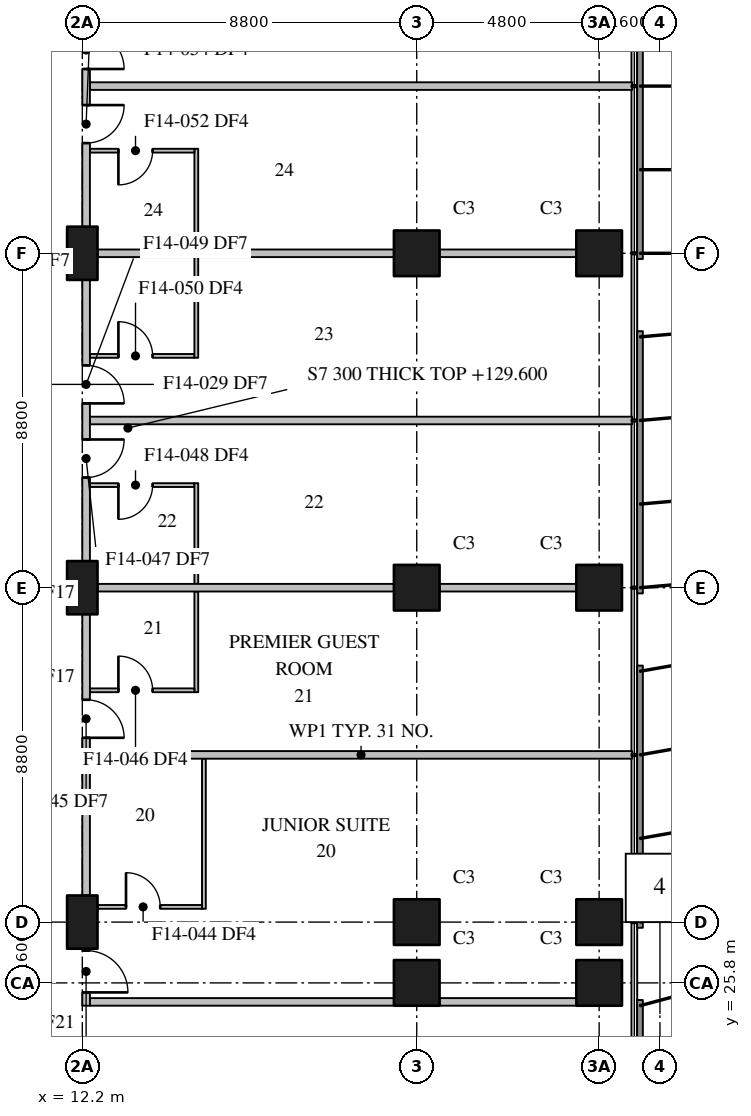
"""IFC4 building model, lengths in metres.
Left out: names, types, materials, properties, quantities, classifications, styles, units other than length and angle.
Written with IfcOpenShell. Run it as: python <this file> out.ifc"""

import sys

from ifc_helpers import new_model, si_unit, direction, frame, frame_2d, origin, origin_2d, place, context, subcontext, project, spatial, rectangle, extrude, element, fill, save


model = new_model("IFC4")
c1 = context("Model", 3, precision=1e-05, world=origin(), true_north=direction((0.0, 1.0)))
c2 = subcontext(c1, "Body", "Model", "MODEL_VIEW")
j1 = project(units=[si_unit("LENGTHUNIT", "METRE"), si_unit("PLANEANGLEUNIT", "RADIAN")], contexts=[c1])
p1 = place(None, origin())
s1 = spatial("IfcSite", under=j1, at=p1, CompositionType="ELEMENT")
p2 = place(p1, origin())
s2 = spatial("IfcBuilding", under=s1, at=p2, CompositionType="ELEMENT")
p3 = place(p2, frame((0.0, 0.0, 129.6)))
s3 = spatial("IfcBuildingStorey", under=s2, at=p3, CompositionType="ELEMENT", Elevation=129.6)
for number, where, z_axis, x_axis in (
    (1, (12.2, 27.4, 0.0), (0.0, 0.0, 1.0), (0.0, 1.0, 0.0)),
    (2, (12.2, 36.2, 0.0), (0.0, 0.0, 1.0), (0.0, 1.0, 0.0)),
    (3, (12.2, 45.0, 0.0), (0.0, 0.0, 1.0), (0.0, 1.0, 0.0)),
):
    element("IfcColumn", number, at=place(p3, frame(where, z_axis=z_axis, x_axis=x_axis)), inside=s3, PredefinedType="COLUMN", context=c2, shape_type="SweptSolid", body=[
        extrude(rectangle(XDim=1.4, YDim=0.8, at=origin_2d()), origin(), (0.0, 0.0, 1.0), 3.7),
    ])
for number, where, z_axis, x_axis in (
    (4, (21.0, 25.8, 0.0), (0.0, 0.0, 1.0), (1.0, 0.0, 0.0)),
    (5, (21.0, 27.4, 0.0), (0.0, 0.0, 1.0), (1.0, 0.0, 0.0)),
    (6, (21.0, 36.2, 0.0), (0.0, 0.0, 1.0), (1.0, 0.0, 0.0)),
    (7, (21.0, 45.0, 0.0), (0.0, 0.0, 1.0), (1.0, 0.0, 0.0)),
    (8, (25.8, 25.8, 0.0), (0.0, 0.0, 1.0), (1.0, 0.0, 0.0)),
    (9, (25.8, 27.4, 0.0), (0.0, 0.0, 1.0), (1.0, 0.0, 0.0)),
    (10, (25.8, 36.2, 0.0), (0.0, 0.0, 1.0), (1.0, 0.0, 0.0)),
    (11, (25.8, 45.0, 0.0), (0.0, 0.0, 1.0), (1.0, 0.0, 0.0)),
):
    element("IfcColumn", number, at=place(p3, frame(where, z_axis=z_axis, x_axis=x_axis)), inside=s3, PredefinedType="COLUMN", context=c2, shape_type="SweptSolid", body=[
        extrude(rectangle(XDim=1.2, YDim=1.2, at=origin_2d()), origin(), (0.0, 0.0, 1.0), 3.7),
    ])
p4 = place(p3, frame((12.4, 31.8, 0.0), z_axis=(0.0, 0.0, 1.0), x_axis=(1.0, 0.0, 0.0)))
e12 = element("IfcWall", 12, at=p4, inside=s3, PredefinedType="PARTITIONING", context=c2, shape_type="SweptSolid", body=[
    extrude(rectangle(XDim=14.27, YDim=0.2, at=frame_2d((7.135, 0.0))), origin(), (0.0, 0.0, 1.0), 3.25),
])
p5 = place(p3, frame((12.6, 36.2, 0.0), z_axis=(0.0, 0.0, 1.0), x_axis=(1.0, 0.0, 0.0)))
e13 = element("IfcWall", 13, at=p5, inside=s3, PredefinedType="PARTITIONING", context=c2, shape_type="SweptSolid", body=[
    extrude(rectangle(XDim=7.8, YDim=0.2, at=frame_2d((3.9, 0.0))), origin(), (0.0, 0.0, 1.0), 3.25),
])
p6 = place(p3, frame((21.6, 36.2, 0.0), z_axis=(0.0, 0.0, 1.0), x_axis=(1.0, 0.0, 0.0)))
e14 = element("IfcWall", 14, at=p6, inside=s3, PredefinedType="PARTITIONING", context=c2, shape_type="SweptSolid", body=[
    extrude(rectangle(XDim=3.6, YDim=0.2, at=frame_2d((1.8, 0.0))), origin(), (0.0, 0.0, 1.0), 3.25),
])
p7 = place(p3, frame((12.4, 40.6, 0.0), z_axis=(0.0, 0.0, 1.0), x_axis=(1.0, 0.0, 0.0)))
e15 = element("IfcWall", 15, at=p7, inside=s3, PredefinedType="PARTITIONING", context=c2, shape_type="SweptSolid", body=[
    extrude(rectangle(XDim=14.27, YDim=0.2, at=frame_2d((7.135, 0.0))), origin(), (0.0, 0.0, 1.0), 3.25),
])
p8 = place(p3, frame((12.6, 45.0, 0.0), z_axis=(0.0, 0.0, 1.0), x_axis=(1.0, 0.0, 0.0)))
e16 = element("IfcWall", 16, at=p8, inside=s3, PredefinedType="PARTITIONING", context=c2, shape_type="SweptSolid", body=[
    extrude(rectangle(XDim=7.8, YDim=0.2, at=frame_2d((3.9, 0.0))), origin(), (0.0, 0.0, 1.0), 3.25),
])
p9 = place(p3, frame((21.6, 45.0, 0.0), z_axis=(0.0, 0.0, 1.0), x_axis=(1.0, 0.0, 0.0)))
e17 = element("IfcWall", 17, at=p9, inside=s3, PredefinedType="PARTITIONING", context=c2, shape_type="SweptSolid", body=[
    extrude(rectangle(XDim=3.6, YDim=0.2, at=frame_2d((1.8, 0.0))), origin(), (0.0, 0.0, 1.0), 3.25),
])
p10 = place(p3, frame((12.4, 49.4, 0.0), z_axis=(0.0, 0.0, 1.0), x_axis=(1.0, 0.0, 0.0)))
e18 = element("IfcWall", 18, at=p10, inside=s3, PredefinedType="PARTITIONING", context=c2, shape_type="SweptSolid", body=[
    extrude(rectangle(XDim=14.27, YDim=0.2, at=frame_2d((7.135, 0.0))), origin(), (0.0, 0.0, 1.0), 3.25),
])
p11 = place(p3, frame((12.3, 26.7, 0.0), z_axis=(0.0, 0.0, 1.0), x_axis=(0.0, -1.0, 0.0)))
e19 = element("IfcWall", 19, at=p11, inside=s3, PredefinedType="PARTITIONING", context=c2, shape_type="SweptSolid", body=[
    extrude(rectangle(XDim=1.5, YDim=0.2, at=frame_2d((0.75, 0.0))), origin(), (0.0, 0.0, 1.0), 3.25),
])
p12 = place(p11, frame((0.05, 0.0, 0.0)))
e20 = element("IfcOpeningElement", 20, at=p12, cuts=e19, PredefinedType="OPENING", context=c2, shape_type="SweptSolid", body=[
    extrude(rectangle(XDim=1.1, YDim=2.1, at=frame_2d((0.55, 1.05))), frame((0.0, 0.11, 0.0), z_axis=(0.0, -1.0, 0.0), x_axis=(1.0, 0.0, 0.0)), (0.0, 0.0, 1.0), 0.22),
])
p13 = place(p3, frame((12.3, 35.5, 0.0), z_axis=(0.0, 0.0, 1.0), x_axis=(0.0, -1.0, 0.0)))
e21 = element("IfcWall", 21, at=p13, inside=s3, PredefinedType="PARTITIONING", context=c2, shape_type="SweptSolid", body=[
    extrude(rectangle(XDim=7.4, YDim=0.2, at=frame_2d((3.7, 0.0))), origin(), (0.0, 0.0, 1.0), 3.25),
])
p14 = place(p13, frame((2.25, 0.0, 0.0)))
e22 = element("IfcOpeningElement", 22, at=p14, cuts=e21, PredefinedType="OPENING", context=c2, shape_type="SweptSolid", body=[
    extrude(rectangle(XDim=1.0, YDim=2.1, at=frame_2d((0.5, 1.05))), frame((0.0, 0.11, 0.0), z_axis=(0.0, -1.0, 0.0), x_axis=(1.0, 0.0, 0.0)), (0.0, 0.0, 1.0), 0.22),
])
p15 = place(p3, frame((12.3, 44.3, 0.0), z_axis=(0.0, 0.0, 1.0), x_axis=(0.0, -1.0, 0.0)))
e23 = element("IfcWall", 23, at=p15, inside=s3, PredefinedType="PARTITIONING", context=c2, shape_type="SweptSolid", body=[
    extrude(rectangle(XDim=7.4, YDim=0.2, at=frame_2d((3.7, 0.0))), origin(), (0.0, 0.0, 1.0), 3.25),
])
p16 = place(p15, frame((4.2, 0.0, 0.0)))
e24 = element("IfcOpeningElement", 24, at=p16, cuts=e23, PredefinedType="OPENING", context=c2, shape_type="SweptSolid", body=[
    extrude(rectangle(XDim=1.0, YDim=2.1, at=frame_2d((0.5, 1.05))), frame((0.0, 0.11, 0.0), z_axis=(0.0, -1.0, 0.0), x_axis=(1.0, 0.0, 0.0)), (0.0, 0.0, 1.0), 0.22),
])
p17 = place(p15, frame((2.25, 0.0, 0.0)))
e25 = element("IfcOpeningElement", 25, at=p17, cuts=e23, PredefinedType="OPENING", context=c2, shape_type="SweptSolid", body=[
    extrude(rectangle(XDim=1.0, YDim=2.1, at=frame_2d((0.5, 1.05))), frame((0.0, 0.11, 0.0), z_axis=(0.0, -1.0, 0.0), x_axis=(1.0, 0.0, 0.0)), (0.0, 0.0, 1.0), 0.22),
])
p18 = place(p3, frame((12.3, 53.1, 0.0), z_axis=(0.0, 0.0, 1.0), x_axis=(0.0, -1.0, 0.0)))
e26 = element("IfcWall", 26, at=p18, inside=s3, PredefinedType="PARTITIONING", context=c2, shape_type="SweptSolid", body=[
    extrude(rectangle(XDim=7.4, YDim=0.2, at=frame_2d((3.7, 0.0))), origin(), (0.0, 0.0, 1.0), 3.25),
])
p19 = place(p18, frame((4.2, 0.0, 0.0)))
e27 = element("IfcOpeningElement", 27, at=p19, cuts=e26, PredefinedType="OPENING", context=c2, shape_type="SweptSolid", body=[
    extrude(rectangle(XDim=1.0, YDim=2.1, at=frame_2d((0.5, 1.05))), frame((0.0, 0.11, 0.0), z_axis=(0.0, -1.0, 0.0), x_axis=(1.0, 0.0, 0.0)), (0.0, 0.0, 1.0), 0.22),
])
p20 = place(p18, frame((2.25, 0.0, 0.0)))
e28 = element("IfcOpeningElement", 28, at=p20, cuts=e26, PredefinedType="OPENING", context=c2, shape_type="SweptSolid", body=[
    extrude(rectangle(XDim=1.0, YDim=2.1, at=frame_2d((0.5, 1.05))), frame((0.0, 0.11, 0.0), z_axis=(0.0, -1.0, 0.0), x_axis=(1.0, 0.0, 0.0)), (0.0, 0.0, 1.0), 0.22),
])
p21 = place(p3, frame((12.4, 25.3, 0.0), z_axis=(0.0, 0.0, 1.0), x_axis=(1.0, 0.0, 0.0)))
e29 = element("IfcWall", 29, at=p21, inside=s3, PredefinedType="PARTITIONING", context=c2, shape_type="SweptSolid", body=[
    extrude(rectangle(XDim=8.0, YDim=0.2, at=frame_2d((4.0, 0.0))), origin(), (0.0, 0.0, 1.0), 3.25),
])
p22 = place(p3, frame((21.6, 25.3, 0.0), z_axis=(0.0, 0.0, 1.0), x_axis=(1.0, 0.0, 0.0)))
e30 = element("IfcWall", 30, at=p22, inside=s3, PredefinedType="PARTITIONING", context=c2, shape_type="SweptSolid", body=[
    extrude(rectangle(XDim=3.6, YDim=0.2, at=frame_2d((1.8, 0.0))), origin(), (0.0, 0.0, 1.0), 3.25),
])
p23 = place(p3, frame((12.6, 27.8, 0.0), z_axis=(0.0, 0.0, 1.0), x_axis=(1.0, 0.0, 0.0)))
e31 = element("IfcWall", 31, at=p23, inside=s3, PredefinedType="PARTITIONING", context=c2, shape_type="SweptSolid", body=[
    extrude(rectangle(XDim=2.75, YDim=0.1, at=frame_2d((1.375, 0.0))), origin(), (0.0, 0.0, 1.0), 3.25),
])
p24 = place(p23, frame((0.75, 0.0, 0.0)))
e32 = element("IfcOpeningElement", 32, at=p24, cuts=e31, PredefinedType="OPENING", context=c2, shape_type="SweptSolid", body=[
    extrude(rectangle(XDim=0.9, YDim=2.1, at=frame_2d((0.45, 1.05))), frame((0.0, 0.06, 0.0), z_axis=(0.0, -1.0, 0.0), x_axis=(1.0, 0.0, 0.0)), (0.0, 0.0, 1.0), 0.12),
])
p25 = place(p3, frame((15.15, 38.9, 0.0), z_axis=(0.0, 0.0, 1.0), x_axis=(-1.0, 0.0, 0.0)))
e33 = element("IfcWall", 33, at=p25, inside=s3, PredefinedType="PARTITIONING", context=c2, shape_type="SweptSolid", body=[
    extrude(rectangle(XDim=2.75, YDim=0.1, at=frame_2d((1.375, 0.0))), origin(), (0.0, 0.0, 1.0), 3.25),
])
p26 = place(p25, frame((1.1, 0.0, 0.0)))
e34 = element("IfcOpeningElement", 34, at=p26, cuts=e33, PredefinedType="OPENING", context=c2, shape_type="SweptSolid", body=[
    extrude(rectangle(XDim=0.9, YDim=2.1, at=frame_2d((0.45, 1.05))), frame((0.0, 0.06, 0.0), z_axis=(0.0, -1.0, 0.0), x_axis=(1.0, 0.0, 0.0)), (0.0, 0.0, 1.0), 0.12),
])
p27 = place(p3, frame((12.4, 42.3, 0.0), z_axis=(0.0, 0.0, 1.0), x_axis=(1.0, 0.0, 0.0)))
e35 = element("IfcWall", 35, at=p27, inside=s3, PredefinedType="PARTITIONING", context=c2, shape_type="SweptSolid", body=[
    extrude(rectangle(XDim=2.75, YDim=0.1, at=frame_2d((1.375, 0.0))), origin(), (0.0, 0.0, 1.0), 3.25),
])
p28 = place(p27, frame((0.75, 0.0, 0.0)))
e36 = element("IfcOpeningElement", 36, at=p28, cuts=e35, PredefinedType="OPENING", context=c2, shape_type="SweptSolid", body=[
    extrude(rectangle(XDim=0.9, YDim=2.1, at=frame_2d((0.45, 1.05))), frame((0.0, 0.06, 0.0), z_axis=(0.0, -1.0, 0.0), x_axis=(1.0, 0.0, 0.0)), (0.0, 0.0, 1.0), 0.12),
])
p29 = place(p3, frame((15.4, 27.75, 0.0), z_axis=(0.0, 0.0, 1.0), x_axis=(0.0, 1.0, 0.0)))
e37 = element("IfcWall", 37, at=p29, inside=s3, PredefinedType="PARTITIONING", context=c2, shape_type="SweptSolid", body=[
    extrude(rectangle(XDim=3.95, YDim=0.1, at=frame_2d((1.975, 0.0))), origin(), (0.0, 0.0, 1.0), 3.25),
])
p30 = place(p3, frame((15.2, 33.45, 0.0), z_axis=(0.0, 0.0, 1.0), x_axis=(0.0, 1.0, 0.0)))
e38 = element("IfcWall", 38, at=p30, inside=s3, PredefinedType="PARTITIONING", context=c2, shape_type="SweptSolid", body=[
    extrude(rectangle(XDim=2.65, YDim=0.1, at=frame_2d((1.325, 0.0))), origin(), (0.0, 0.0, 1.0), 3.25),
])
for number, where, z_axis, x_axis in (
    (39, (15.2, 36.3, 0.0), (0.0, 0.0, 1.0), (0.0, 1.0, 0.0)),
    (40, (15.2, 42.25, 0.0), (0.0, 0.0, 1.0), (0.0, 1.0, 0.0)),
    (41, (15.2, 45.1, 0.0), (0.0, 0.0, 1.0), (0.0, 1.0, 0.0)),
):
    element("IfcWall", number, at=place(p3, frame(where, z_axis=z_axis, x_axis=x_axis)), inside=s3, PredefinedType="PARTITIONING", context=c2, shape_type="SweptSolid", body=[
        extrude(rectangle(XDim=2.65, YDim=0.1, at=frame_2d((1.325, 0.0))), origin(), (0.0, 0.0, 1.0), 3.25),
    ])
p31 = place(p3, frame((12.4, 33.5, 0.0), z_axis=(0.0, 0.0, 1.0), x_axis=(1.0, 0.0, 0.0)))
e42 = element("IfcWall", 42, at=p31, inside=s3, PredefinedType="PARTITIONING", context=c2, shape_type="SweptSolid", body=[
    extrude(rectangle(XDim=2.75, YDim=0.1, at=frame_2d((1.375, 0.0))), origin(), (0.0, 0.0, 1.0), 3.25),
])
p32 = place(p31, frame((0.75, 0.0, 0.0)))
e43 = element("IfcOpeningElement", 43, at=p32, cuts=e42, PredefinedType="OPENING", context=c2, shape_type="SweptSolid", body=[
    extrude(rectangle(XDim=0.9, YDim=2.1, at=frame_2d((0.45, 1.05))), frame((0.0, 0.06, 0.0), z_axis=(0.0, -1.0, 0.0), x_axis=(1.0, 0.0, 0.0)), (0.0, 0.0, 1.0), 0.12),
])
p33 = place(p3, frame((15.15, 47.7, 0.0), z_axis=(0.0, 0.0, 1.0), x_axis=(-1.0, 0.0, 0.0)))
e44 = element("IfcWall", 44, at=p33, inside=s3, PredefinedType="PARTITIONING", context=c2, shape_type="SweptSolid", body=[
    extrude(rectangle(XDim=2.75, YDim=0.1, at=frame_2d((1.375, 0.0))), origin(), (0.0, 0.0, 1.0), 3.25),
])
p34 = place(p33, frame((1.1, 0.0, 0.0)))
e45 = element("IfcOpeningElement", 45, at=p34, cuts=e44, PredefinedType="OPENING", context=c2, shape_type="SweptSolid", body=[
    extrude(rectangle(XDim=0.9, YDim=2.1, at=frame_2d((0.45, 1.05))), frame((0.0, 0.06, 0.0), z_axis=(0.0, -1.0, 0.0), x_axis=(1.0, 0.0, 0.0)), (0.0, 0.0, 1.0), 0.12),
])
p35 = place(p12, origin())
e46 = element("IfcDoor", 46, at=p35, inside=s3, OperationType="SINGLE_SWING_RIGHT", PredefinedType="DOOR", context=c2, shape_type="SweptSolid", body=[
    extrude(rectangle(XDim=1.1, YDim=2.1, at=frame_2d((0.55, 1.05))), frame((0.0, 0.025, 0.0), z_axis=(0.0, -1.0, 0.0), x_axis=(1.0, 0.0, 0.0)), (0.0, 0.0, 1.0), 0.05),
])
fill(e20, e46)
p36 = place(p24, origin())
e47 = element("IfcDoor", 47, at=p36, inside=s3, OperationType="SINGLE_SWING_LEFT", PredefinedType="DOOR", context=c2, shape_type="SweptSolid", body=[
    extrude(rectangle(XDim=0.9, YDim=2.1, at=frame_2d((0.45, 1.05))), frame((0.0, 0.025, 0.0), z_axis=(0.0, -1.0, 0.0), x_axis=(1.0, 0.0, 0.0)), (0.0, 0.0, 1.0), 0.05),
])
fill(e32, e47)
p37 = place(p14, origin())
e48 = element("IfcDoor", 48, at=p37, inside=s3, OperationType="SINGLE_SWING_RIGHT", PredefinedType="DOOR", context=c2, shape_type="SweptSolid", body=[
    extrude(rectangle(XDim=1.0, YDim=2.1, at=frame_2d((0.5, 1.05))), frame((0.0, 0.025, 0.0), z_axis=(0.0, -1.0, 0.0), x_axis=(1.0, 0.0, 0.0)), (0.0, 0.0, 1.0), 0.05),
])
fill(e22, e48)
p38 = place(p32, origin())
e49 = element("IfcDoor", 49, at=p38, inside=s3, OperationType="SINGLE_SWING_LEFT", PredefinedType="DOOR", context=c2, shape_type="SweptSolid", body=[
    extrude(rectangle(XDim=0.9, YDim=2.1, at=frame_2d((0.45, 1.05))), frame((0.0, 0.025, 0.0), z_axis=(0.0, -1.0, 0.0), x_axis=(1.0, 0.0, 0.0)), (0.0, 0.0, 1.0), 0.05),
])
fill(e43, e49)
p39 = place(p16, origin())
e50 = element("IfcDoor", 50, at=p39, inside=s3, OperationType="SINGLE_SWING_LEFT", PredefinedType="DOOR", context=c2, shape_type="SweptSolid", body=[
    extrude(rectangle(XDim=1.0, YDim=2.1, at=frame_2d((0.5, 1.05))), frame((0.0, 0.025, 0.0), z_axis=(0.0, -1.0, 0.0), x_axis=(1.0, 0.0, 0.0)), (0.0, 0.0, 1.0), 0.05),
])
fill(e24, e50)
p40 = place(p26, origin())
e51 = element("IfcDoor", 51, at=p40, inside=s3, OperationType="SINGLE_SWING_RIGHT", PredefinedType="DOOR", context=c2, shape_type="SweptSolid", body=[
    extrude(rectangle(XDim=0.9, YDim=2.1, at=frame_2d((0.45, 1.05))), frame((0.0, 0.025, 0.0), z_axis=(0.0, -1.0, 0.0), x_axis=(1.0, 0.0, 0.0)), (0.0, 0.0, 1.0), 0.05),
])
fill(e34, e51)
p41 = place(p17, origin())
e52 = element("IfcDoor", 52, at=p41, inside=s3, OperationType="SINGLE_SWING_RIGHT", PredefinedType="DOOR", context=c2, shape_type="SweptSolid", body=[
    extrude(rectangle(XDim=1.0, YDim=2.1, at=frame_2d((0.5, 1.05))), frame((0.0, 0.025, 0.0), z_axis=(0.0, -1.0, 0.0), x_axis=(1.0, 0.0, 0.0)), (0.0, 0.0, 1.0), 0.05),
])
fill(e25, e52)
p42 = place(p28, origin())
e53 = element("IfcDoor", 53, at=p42, inside=s3, OperationType="SINGLE_SWING_LEFT", PredefinedType="DOOR", context=c2, shape_type="SweptSolid", body=[
    extrude(rectangle(XDim=0.9, YDim=2.1, at=frame_2d((0.45, 1.05))), frame((0.0, 0.025, 0.0), z_axis=(0.0, -1.0, 0.0), x_axis=(1.0, 0.0, 0.0)), (0.0, 0.0, 1.0), 0.05),
])
fill(e36, e53)
p43 = place(p19, origin())
e54 = element("IfcDoor", 54, at=p43, inside=s3, OperationType="SINGLE_SWING_LEFT", PredefinedType="DOOR", context=c2, shape_type="SweptSolid", body=[
    extrude(rectangle(XDim=1.0, YDim=2.1, at=frame_2d((0.5, 1.05))), frame((0.0, 0.025, 0.0), z_axis=(0.0, -1.0, 0.0), x_axis=(1.0, 0.0, 0.0)), (0.0, 0.0, 1.0), 0.05),
])
fill(e27, e54)
p44 = place(p34, origin())
e55 = element("IfcDoor", 55, at=p44, inside=s3, OperationType="SINGLE_SWING_RIGHT", PredefinedType="DOOR", context=c2, shape_type="SweptSolid", body=[
    extrude(rectangle(XDim=0.9, YDim=2.1, at=frame_2d((0.45, 1.05))), frame((0.0, 0.025, 0.0), z_axis=(0.0, -1.0, 0.0), x_axis=(1.0, 0.0, 0.0)), (0.0, 0.0, 1.0), 0.05),
])
fill(e45, e55)
p45 = place(p20, origin())
e56 = element("IfcDoor", 56, at=p45, inside=s3, OperationType="SINGLE_SWING_RIGHT", PredefinedType="DOOR", context=c2, shape_type="SweptSolid", body=[
    extrude(rectangle(XDim=1.0, YDim=2.1, at=frame_2d((0.5, 1.05))), frame((0.0, 0.025, 0.0), z_axis=(0.0, -1.0, 0.0), x_axis=(1.0, 0.0, 0.0)), (0.0, 0.0, 1.0), 0.05),
])
fill(e28, e56)
save(model, sys.argv[1])
